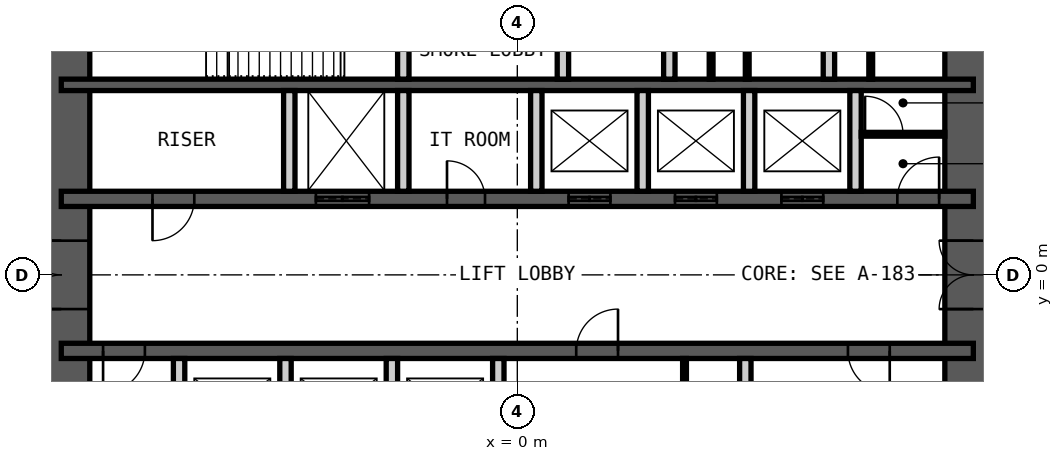
"""IFC4 building model, lengths in metres.
Left out: names, types, materials, properties, quantities, classifications, styles, units other than length and angle.
Written with IfcOpenShell. Run it as: python <this file> out.ifc"""

import sys

from ifc_helpers import new_model, si_unit, direction, frame, frame_2d, origin, place, context, subcontext, project, spatial, rectangle, extrude, element, fill, save


model = new_model("IFC4")
c1 = context("Model", 3, precision=1e-05, world=origin(), true_north=direction((0.0, 1.0)))
c2 = subcontext(c1, "Body", "Model", "MODEL_VIEW")
j1 = project(units=[si_unit("LENGTHUNIT", "METRE"), si_unit("PLANEANGLEUNIT", "RADIAN")], contexts=[c1])
p1 = place(None, origin())
s1 = spatial("IfcSite", under=j1, at=p1, CompositionType="ELEMENT")
p2 = place(p1, origin())
s2 = spatial("IfcBuilding", under=s1, at=p2, CompositionType="ELEMENT")
p3 = place(p2, frame((0.0, 0.0, 92.0)))
s3 = spatial("IfcBuildingStorey", under=s2, at=p3, CompositionType="ELEMENT", Elevation=92.0)
p4 = place(p3, frame((12.0, -9.0, 0.0), z_axis=(0.0, 0.0, 1.0), x_axis=(0.0, 1.0, 0.0)))
e1 = element("IfcWall", 1, at=p4, inside=s3, PredefinedType="SHEAR", context=c2, shape_type="SweptSolid", body=[
    extrude(rectangle(XDim=18.0, YDim=1.5, at=frame_2d((9.0, 0.0))), origin(), (0.0, 0.0, 1.0), 5.0),
])
p5 = place(p4, frame((8.1, 0.0, 0.0)))
e2 = element("IfcOpeningElement", 2, at=p5, cuts=e1, PredefinedType="OPENING", context=c2, shape_type="SweptSolid", body=[
    extrude(rectangle(XDim=1.8, YDim=2.1, at=frame_2d((0.9, 1.05))), frame((0.0, 0.76, 0.0), z_axis=(0.0, -1.0, 0.0), x_axis=(1.0, 0.0, 0.0)), (0.0, 0.0, 1.0), 1.52),
])
p6 = place(p3, frame((-12.0, -9.0, 0.0), z_axis=(0.0, 0.0, 1.0), x_axis=(0.0, 1.0, 0.0)))
e3 = element("IfcWall", 3, at=p6, inside=s3, PredefinedType="SHEAR", context=c2, shape_type="SweptSolid", body=[
    extrude(rectangle(XDim=18.0, YDim=1.5, at=frame_2d((9.0, 0.0))), origin(), (0.0, 0.0, 1.0), 5.0),
])
p7 = place(p6, frame((8.1, 0.0, 0.0)))
e4 = element("IfcOpeningElement", 4, at=p7, cuts=e3, PredefinedType="OPENING", context=c2, shape_type="SweptSolid", body=[
    extrude(rectangle(XDim=1.8, YDim=2.1, at=frame_2d((0.9, 1.05))), frame((0.0, 0.76, 0.0), z_axis=(0.0, -1.0, 0.0), x_axis=(1.0, 0.0, 0.0)), (0.0, 0.0, 1.0), 1.52),
])
p8 = place(p3, frame((-12.0, 5.0, 0.0), z_axis=(0.0, 0.0, 1.0), x_axis=(1.0, 0.0, 0.0)))
e5 = element("IfcWall", 5, at=p8, inside=s3, PredefinedType="SHEAR", context=c2, shape_type="SweptSolid", body=[
    extrude(rectangle(XDim=24.0, YDim=0.3, at=frame_2d((12.0, 0.0))), origin(), (0.0, 0.0, 1.0), 5.0),
])
p9 = place(p3, frame((-12.0, 2.0, 0.0), z_axis=(0.0, 0.0, 1.0), x_axis=(1.0, 0.0, 0.0)))
e6 = element("IfcWall", 6, at=p9, inside=s3, PredefinedType="SHEAR", context=c2, shape_type="SweptSolid", body=[
    extrude(rectangle(XDim=24.0, YDim=0.4, at=frame_2d((12.0, 0.0))), origin(), (0.0, 0.0, 1.0), 5.0),
])
p10 = place(p9, frame((2.4, 0.0, 0.0)))
e7 = element("IfcOpeningElement", 7, at=p10, cuts=e6, PredefinedType="OPENING", context=c2, shape_type="SweptSolid", body=[
    extrude(rectangle(XDim=1.1, YDim=2.1, at=frame_2d((0.55, 1.05))), frame((0.0, 0.21, 0.0), z_axis=(0.0, -1.0, 0.0), x_axis=(1.0, 0.0, 0.0)), (0.0, 0.0, 1.0), 0.42),
])
p11 = place(p9, frame((22.0, 0.0, 0.0)))
e8 = element("IfcOpeningElement", 8, at=p11, cuts=e6, PredefinedType="OPENING", context=c2, shape_type="SweptSolid", body=[
    extrude(rectangle(XDim=1.1, YDim=2.1, at=frame_2d((0.55, 1.05))), frame((0.0, 0.21, 0.0), z_axis=(0.0, -1.0, 0.0), x_axis=(1.0, 0.0, 0.0)), (0.0, 0.0, 1.0), 0.42),
])
p12 = place(p9, frame((10.15, 0.0, 0.0)))
e9 = element("IfcOpeningElement", 9, at=p12, cuts=e6, PredefinedType="OPENING", context=c2, shape_type="SweptSolid", body=[
    extrude(rectangle(XDim=1.0, YDim=2.1, at=frame_2d((0.5, 1.05))), frame((0.0, 0.21, 0.0), z_axis=(0.0, -1.0, 0.0), x_axis=(1.0, 0.0, 0.0)), (0.0, 0.0, 1.0), 0.42),
])
p13 = place(p9, frame((6.7, 0.0, 0.0)))
e10 = element("IfcOpeningElement", 10, at=p13, cuts=e6, PredefinedType="OPENING", context=c2, shape_type="SweptSolid", body=[
    extrude(rectangle(XDim=1.4, YDim=2.4, at=frame_2d((0.7, 1.2))), frame((0.0, 0.21, 0.0), z_axis=(0.0, -1.0, 0.0), x_axis=(1.0, 0.0, 0.0)), (0.0, 0.0, 1.0), 0.42),
])
p14 = place(p9, frame((13.35, 0.0, 0.0)))
e11 = element("IfcOpeningElement", 11, at=p14, cuts=e6, PredefinedType="OPENING", context=c2, shape_type="SweptSolid", body=[
    extrude(rectangle(XDim=1.1, YDim=2.4, at=frame_2d((0.55, 1.2))), frame((0.0, 0.21, 0.0), z_axis=(0.0, -1.0, 0.0), x_axis=(1.0, 0.0, 0.0)), (0.0, 0.0, 1.0), 0.42),
])
p15 = place(p9, frame((16.15, 0.0, 0.0)))
e12 = element("IfcOpeningElement", 12, at=p15, cuts=e6, PredefinedType="OPENING", context=c2, shape_type="SweptSolid", body=[
    extrude(rectangle(XDim=1.1, YDim=2.4, at=frame_2d((0.55, 1.2))), frame((0.0, 0.21, 0.0), z_axis=(0.0, -1.0, 0.0), x_axis=(1.0, 0.0, 0.0)), (0.0, 0.0, 1.0), 0.42),
])
p16 = place(p9, frame((18.95, 0.0, 0.0)))
e13 = element("IfcOpeningElement", 13, at=p16, cuts=e6, PredefinedType="OPENING", context=c2, shape_type="SweptSolid", body=[
    extrude(rectangle(XDim=1.1, YDim=2.4, at=frame_2d((0.55, 1.2))), frame((0.0, 0.21, 0.0), z_axis=(0.0, -1.0, 0.0), x_axis=(1.0, 0.0, 0.0)), (0.0, 0.0, 1.0), 0.42),
])
p17 = place(p3, frame((-12.0, -2.0, 0.0), z_axis=(0.0, 0.0, 1.0), x_axis=(1.0, 0.0, 0.0)))
e14 = element("IfcWall", 14, at=p17, inside=s3, PredefinedType="SHEAR", context=c2, shape_type="SweptSolid", body=[
    extrude(rectangle(XDim=24.0, YDim=0.4, at=frame_2d((12.0, 0.0))), origin(), (0.0, 0.0, 1.0), 5.0),
])
p18 = place(p17, frame((1.1, 0.0, 0.0)))
e15 = element("IfcOpeningElement", 15, at=p18, cuts=e14, PredefinedType="OPENING", context=c2, shape_type="SweptSolid", body=[
    extrude(rectangle(XDim=1.1, YDim=2.1, at=frame_2d((0.55, 1.05))), frame((0.0, 0.21, 0.0), z_axis=(0.0, -1.0, 0.0), x_axis=(1.0, 0.0, 0.0)), (0.0, 0.0, 1.0), 0.42),
])
p19 = place(p17, frame((13.55, 0.0, 0.0)))
e16 = element("IfcOpeningElement", 16, at=p19, cuts=e14, PredefinedType="OPENING", context=c2, shape_type="SweptSolid", body=[
    extrude(rectangle(XDim=1.1, YDim=2.1, at=frame_2d((0.55, 1.05))), frame((0.0, 0.21, 0.0), z_axis=(0.0, -1.0, 0.0), x_axis=(1.0, 0.0, 0.0)), (0.0, 0.0, 1.0), 0.42),
])
p20 = place(p17, frame((20.7, 0.0, 0.0)))
e17 = element("IfcOpeningElement", 17, at=p20, cuts=e14, PredefinedType="OPENING", context=c2, shape_type="SweptSolid", body=[
    extrude(rectangle(XDim=1.1, YDim=2.1, at=frame_2d((0.55, 1.05))), frame((0.0, 0.21, 0.0), z_axis=(0.0, -1.0, 0.0), x_axis=(1.0, 0.0, 0.0)), (0.0, 0.0, 1.0), 0.42),
])
p21 = place(p3, frame((-3.0, 5.15, 0.0), z_axis=(0.0, 0.0, 1.0), x_axis=(0.0, 1.0, 0.0)))
e18 = element("IfcWall", 18, at=p21, inside=s3, PredefinedType="PARTITIONING", context=c2, shape_type="SweptSolid", body=[
    extrude(rectangle(XDim=3.85, YDim=0.3, at=frame_2d((1.925, 0.0))), origin(), (0.0, 0.0, 1.0), 4.78),
])
p22 = place(p21, frame((1.425, 0.0, 0.0)))
e19 = element("IfcOpeningElement", 19, at=p22, cuts=e18, PredefinedType="OPENING", context=c2, shape_type="SweptSolid", body=[
    extrude(rectangle(XDim=1.0, YDim=2.1, at=frame_2d((0.5, 1.05))), frame((0.0, 0.16, 0.0), z_axis=(0.0, -1.0, 0.0), x_axis=(1.0, 0.0, 0.0)), (0.0, 0.0, 1.0), 0.32),
])
p23 = place(p3, frame((1.2, 5.15, 0.0), z_axis=(0.0, 0.0, 1.0), x_axis=(0.0, 1.0, 0.0)))
e20 = element("IfcWall", 20, at=p23, inside=s3, PredefinedType="PARTITIONING", context=c2, shape_type="SweptSolid", body=[
    extrude(rectangle(XDim=3.85, YDim=0.3, at=frame_2d((1.925, 0.0))), origin(), (0.0, 0.0, 1.0), 4.78),
])
p24 = place(p23, frame((1.375, 0.0, 0.0)))
e21 = element("IfcOpeningElement", 21, at=p24, cuts=e20, PredefinedType="OPENING", context=c2, shape_type="SweptSolid", body=[
    extrude(rectangle(XDim=1.1, YDim=2.4, at=frame_2d((0.55, 1.2))), frame((0.0, 0.16, 0.0), z_axis=(0.0, -1.0, 0.0), x_axis=(1.0, 0.0, 0.0)), (0.0, 0.0, 1.0), 0.32),
])
for number, where, z_axis, x_axis in (
    (22, (4.0, 5.15, 0.0), (0.0, 0.0, 1.0), (0.0, 1.0, 0.0)),
    (23, (8.2, 5.15, 0.0), (0.0, 0.0, 1.0), (0.0, 1.0, 0.0)),
):
    element("IfcWall", number, at=place(p3, frame(where, z_axis=z_axis, x_axis=x_axis)), inside=s3, PredefinedType="PARTITIONING", context=c2, shape_type="SweptSolid", body=[
        extrude(rectangle(XDim=3.85, YDim=0.3, at=frame_2d((1.925, 0.0))), origin(), (0.0, 0.0, 1.0), 4.78),
    ])
for number, where, z_axis, x_axis in (
    (24, (-6.0, 2.2, 0.0), (0.0, 0.0, 1.0), (0.0, 1.0, 0.0)),
    (25, (-3.0, 2.2, 0.0), (0.0, 0.0, 1.0), (0.0, 1.0, 0.0)),
    (26, (0.5, 2.2, 0.0), (0.0, 0.0, 1.0), (0.0, 1.0, 0.0)),
    (27, (3.3, 2.2, 0.0), (0.0, 0.0, 1.0), (0.0, 1.0, 0.0)),
    (28, (6.1, 2.2, 0.0), (0.0, 0.0, 1.0), (0.0, 1.0, 0.0)),
    (29, (8.9, 2.2, 0.0), (0.0, 0.0, 1.0), (0.0, 1.0, 0.0)),
    (30, (-8.9, -4.85, 0.0), (0.0, 0.0, 1.0), (0.0, 1.0, 0.0)),
    (31, (-6.1, -4.85, 0.0), (0.0, 0.0, 1.0), (0.0, 1.0, 0.0)),
    (32, (-3.3, -4.85, 0.0), (0.0, 0.0, 1.0), (0.0, 1.0, 0.0)),
    (33, (-0.5, -4.85, 0.0), (0.0, 0.0, 1.0), (0.0, 1.0, 0.0)),
    (34, (6.0, -4.85, 0.0), (0.0, 0.0, 1.0), (0.0, 1.0, 0.0)),
):
    element("IfcWall", number, at=place(p3, frame(where, z_axis=z_axis, x_axis=x_axis)), inside=s3, PredefinedType="PARTITIONING", context=c2, shape_type="SweptSolid", body=[
        extrude(rectangle(XDim=2.65, YDim=0.3, at=frame_2d((1.325, 0.0))), origin(), (0.0, 0.0, 1.0), 4.78),
    ])
p25 = place(p3, frame((4.4, -4.85, 0.0), z_axis=(0.0, 0.0, 1.0), x_axis=(0.0, 1.0, 0.0)))
e35 = element("IfcWall", 35, at=p25, inside=s3, PredefinedType="PARTITIONING", context=c2, shape_type="SweptSolid", body=[
    extrude(rectangle(XDim=2.65, YDim=0.1, at=frame_2d((1.325, 0.0))), origin(), (0.0, 0.0, 1.0), 4.78),
])
p26 = place(p25, frame((0.1, 0.0, 0.0)))
e36 = element("IfcOpeningElement", 36, at=p26, cuts=e35, PredefinedType="OPENING", context=c2, shape_type="SweptSolid", body=[
    extrude(rectangle(XDim=1.0, YDim=2.4, at=frame_2d((0.5, 1.2))), frame((0.0, 0.06, 0.0), z_axis=(0.0, -1.0, 0.0), x_axis=(1.0, 0.0, 0.0)), (0.0, 0.0, 1.0), 0.12),
])
p27 = place(p3, frame((9.05, 3.7, 0.0), z_axis=(0.0, 0.0, 1.0), x_axis=(1.0, 0.0, 0.0)))
e37 = element("IfcWall", 37, at=p27, inside=s3, PredefinedType="PARTITIONING", context=c2, shape_type="SweptSolid", body=[
    extrude(rectangle(XDim=2.2, YDim=0.1, at=frame_2d((1.1, 0.0))), origin(), (0.0, 0.0, 1.0), 4.78),
])
p28 = place(p27, frame((0.1, 0.0, 0.0)))
e38 = element("IfcOpeningElement", 38, at=p28, cuts=e37, PredefinedType="OPENING", context=c2, shape_type="SweptSolid", body=[
    extrude(rectangle(XDim=1.0, YDim=2.4, at=frame_2d((0.5, 1.2))), frame((0.0, 0.06, 0.0), z_axis=(0.0, -1.0, 0.0), x_axis=(1.0, 0.0, 0.0)), (0.0, 0.0, 1.0), 0.12),
])
for number, where, z_axis, x_axis in (
    (39, (5.1, 5.15, 0.0), (0.0, 0.0, 1.0), (0.0, 1.0, 0.0)),
    (40, (6.05, 5.15, 0.0), (0.0, 0.0, 1.0), (0.0, 1.0, 0.0)),
    (41, (9.3, 5.15, 0.0), (0.0, 0.0, 1.0), (0.0, 1.0, 0.0)),
):
    element("IfcWall", number, at=place(p3, frame(where, z_axis=z_axis, x_axis=x_axis)), inside=s3, PredefinedType="PARTITIONING", context=c2, shape_type="SweptSolid", body=[
        extrude(rectangle(XDim=1.5, YDim=0.1, at=frame_2d((0.75, 0.0))), origin(), (0.0, 0.0, 1.0), 2.1),
    ])
p29 = place(p10, origin())
e42 = element("IfcDoor", 42, at=p29, inside=s3, OperationType="SINGLE_SWING_LEFT", PredefinedType="DOOR", context=c2, shape_type="SweptSolid", body=[
    extrude(rectangle(XDim=1.1, YDim=2.1, at=frame_2d((0.55, 1.05))), frame((0.0, 0.025, 0.0), z_axis=(0.0, -1.0, 0.0), x_axis=(1.0, 0.0, 0.0)), (0.0, 0.0, 1.0), 0.05),
])
fill(e7, e42)
p30 = place(p18, origin())
e43 = element("IfcDoor", 43, at=p30, inside=s3, OperationType="SINGLE_SWING_LEFT", PredefinedType="DOOR", context=c2, shape_type="SweptSolid", body=[
    extrude(rectangle(XDim=1.1, YDim=2.1, at=frame_2d((0.55, 1.05))), frame((0.0, 0.025, 0.0), z_axis=(0.0, -1.0, 0.0), x_axis=(1.0, 0.0, 0.0)), (0.0, 0.0, 1.0), 0.05),
])
fill(e15, e43)
p31 = place(p11, origin())
e44 = element("IfcDoor", 44, at=p31, inside=s3, OperationType="SINGLE_SWING_LEFT", PredefinedType="DOOR", context=c2, shape_type="SweptSolid", body=[
    extrude(rectangle(XDim=1.1, YDim=2.1, at=frame_2d((0.55, 1.05))), frame((0.0, 0.025, 0.0), z_axis=(0.0, -1.0, 0.0), x_axis=(1.0, 0.0, 0.0)), (0.0, 0.0, 1.0), 0.05),
])
fill(e8, e44)
p32 = place(p12, origin())
e45 = element("IfcDoor", 45, at=p32, inside=s3, OperationType="SINGLE_SWING_RIGHT", PredefinedType="DOOR", context=c2, shape_type="SweptSolid", body=[
    extrude(rectangle(XDim=1.0, YDim=2.1, at=frame_2d((0.5, 1.05))), frame((0.0, 0.025, 0.0), z_axis=(0.0, -1.0, 0.0), x_axis=(1.0, 0.0, 0.0)), (0.0, 0.0, 1.0), 0.05),
])
fill(e9, e45)
p33 = place(p19, origin())
e46 = element("IfcDoor", 46, at=p33, inside=s3, OperationType="SINGLE_SWING_LEFT", PredefinedType="DOOR", context=c2, shape_type="SweptSolid", body=[
    extrude(rectangle(XDim=1.1, YDim=2.1, at=frame_2d((0.55, 1.05))), frame((0.0, 0.025, 0.0), z_axis=(0.0, -1.0, 0.0), x_axis=(1.0, 0.0, 0.0)), (0.0, 0.0, 1.0), 0.05),
])
fill(e16, e46)
p34 = place(p20, origin())
e47 = element("IfcDoor", 47, at=p34, inside=s3, OperationType="SINGLE_SWING_RIGHT", PredefinedType="DOOR", context=c2, shape_type="SweptSolid", body=[
    extrude(rectangle(XDim=1.1, YDim=2.1, at=frame_2d((0.55, 1.05))), frame((0.0, 0.025, 0.0), z_axis=(0.0, -1.0, 0.0), x_axis=(1.0, 0.0, 0.0)), (0.0, 0.0, 1.0), 0.05),
])
fill(e17, e47)
p35 = place(p5, origin())
e48 = element("IfcDoor", 48, at=p35, inside=s3, OperationType="DOUBLE_DOOR_DOUBLE_SWING", PredefinedType="DOOR", context=c2, shape_type="SweptSolid", body=[
    extrude(rectangle(XDim=1.8, YDim=2.1, at=frame_2d((0.9, 1.05))), frame((0.0, 0.025, 0.0), z_axis=(0.0, -1.0, 0.0), x_axis=(1.0, 0.0, 0.0)), (0.0, 0.0, 1.0), 0.05),
])
fill(e2, e48)
p36 = place(p7, origin())
e49 = element("IfcDoor", 49, at=p36, inside=s3, OperationType="DOUBLE_DOOR_DOUBLE_SWING", PredefinedType="DOOR", context=c2, shape_type="SweptSolid", body=[
    extrude(rectangle(XDim=1.8, YDim=2.1, at=frame_2d((0.9, 1.05))), frame((0.0, 0.025, 0.0), z_axis=(0.0, -1.0, 0.0), x_axis=(1.0, 0.0, 0.0)), (0.0, 0.0, 1.0), 0.05),
])
fill(e4, e49)
p37 = place(p13, origin())
e50 = element("IfcDoor", 50, at=p37, inside=s3, OperationType="DOUBLE_DOOR_SLIDING", PredefinedType="DOOR", context=c2, shape_type="SweptSolid", body=[
    extrude(rectangle(XDim=1.4, YDim=2.4, at=frame_2d((0.7, 1.2))), frame((0.0, 0.025, 0.0), z_axis=(0.0, -1.0, 0.0), x_axis=(1.0, 0.0, 0.0)), (0.0, 0.0, 1.0), 0.05),
])
fill(e10, e50)
p38 = place(p14, origin())
e51 = element("IfcDoor", 51, at=p38, inside=s3, OperationType="DOUBLE_DOOR_SLIDING", PredefinedType="DOOR", context=c2, shape_type="SweptSolid", body=[
    extrude(rectangle(XDim=1.1, YDim=2.4, at=frame_2d((0.55, 1.2))), frame((0.0, 0.025, 0.0), z_axis=(0.0, -1.0, 0.0), x_axis=(1.0, 0.0, 0.0)), (0.0, 0.0, 1.0), 0.05),
])
fill(e11, e51)
p39 = place(p15, origin())
e52 = element("IfcDoor", 52, at=p39, inside=s3, OperationType="DOUBLE_DOOR_SLIDING", PredefinedType="DOOR", context=c2, shape_type="SweptSolid", body=[
    extrude(rectangle(XDim=1.1, YDim=2.4, at=frame_2d((0.55, 1.2))), frame((0.0, 0.025, 0.0), z_axis=(0.0, -1.0, 0.0), x_axis=(1.0, 0.0, 0.0)), (0.0, 0.0, 1.0), 0.05),
])
fill(e12, e52)
p40 = place(p16, origin())
e53 = element("IfcDoor", 53, at=p40, inside=s3, OperationType="DOUBLE_DOOR_SLIDING", PredefinedType="DOOR", context=c2, shape_type="SweptSolid", body=[
    extrude(rectangle(XDim=1.1, YDim=2.4, at=frame_2d((0.55, 1.2))), frame((0.0, 0.025, 0.0), z_axis=(0.0, -1.0, 0.0), x_axis=(1.0, 0.0, 0.0)), (0.0, 0.0, 1.0), 0.05),
])
fill(e13, e53)
p41 = place(p28, origin())
e54 = element("IfcDoor", 54, at=p41, inside=s3, OperationType="SINGLE_SWING_RIGHT", PredefinedType="DOOR", context=c2, shape_type="SweptSolid", body=[
    extrude(rectangle(XDim=1.0, YDim=2.4, at=frame_2d((0.5, 1.2))), frame((0.0, 0.025, 0.0), z_axis=(0.0, -1.0, 0.0), x_axis=(1.0, 0.0, 0.0)), (0.0, 0.0, 1.0), 0.05),
])
fill(e38, e54)
save(model, sys.argv[1])
